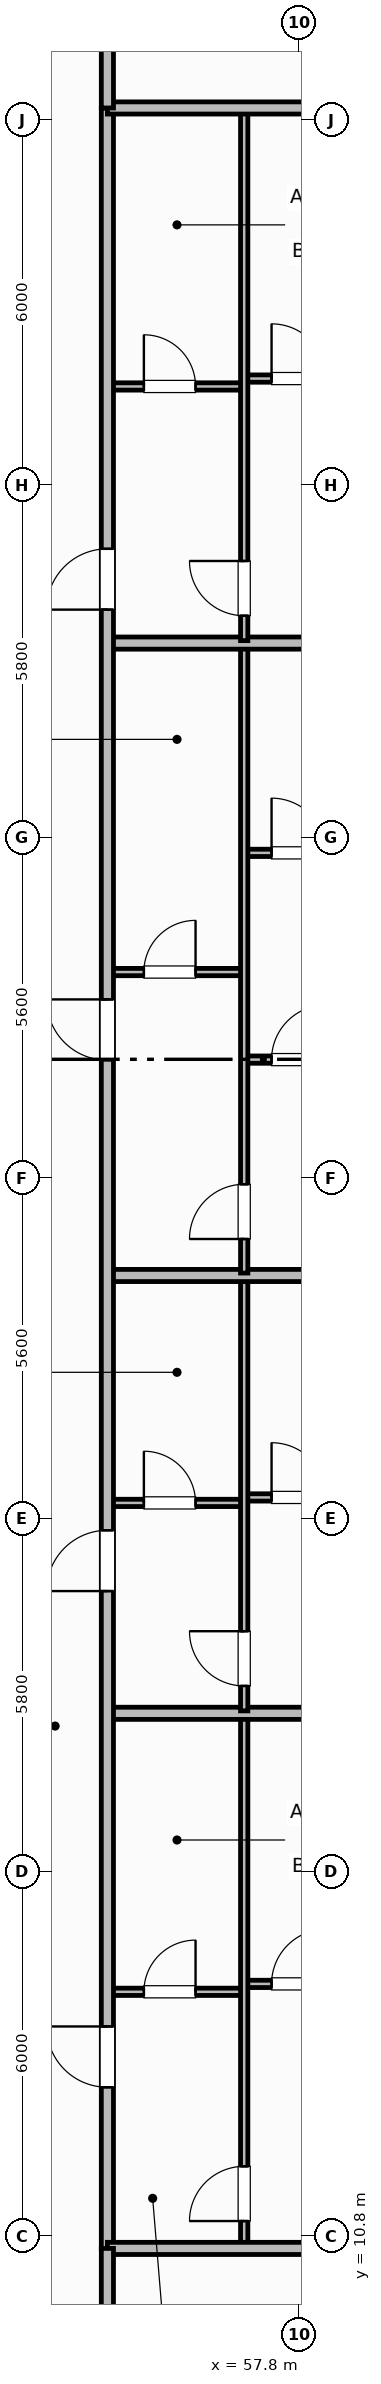
"""IFC4 building model, lengths in metres.
Left out: names, types, materials, properties, quantities, classifications, styles, units other than length and angle.
Written with IfcOpenShell. Run it as: python <this file> out.ifc"""

import sys

from ifc_helpers import new_model, si_unit, direction, frame, frame_2d, origin, place, context, subcontext, project, spatial, rectangle, extrude, element, fill, save


model = new_model("IFC4")
c1 = context("Model", 3, precision=1e-05, world=origin(), true_north=direction((0.0, 1.0)))
c2 = subcontext(c1, "Body", "Model", "MODEL_VIEW")
j1 = project(units=[si_unit("LENGTHUNIT", "METRE"), si_unit("PLANEANGLEUNIT", "RADIAN")], contexts=[c1])
p1 = place(None, origin())
s1 = spatial("IfcSite", under=j1, at=p1, CompositionType="ELEMENT")
p2 = place(p1, origin())
s2 = spatial("IfcBuilding", under=s1, at=p2, CompositionType="ELEMENT")
p3 = place(p2, frame((0.0, 0.0, 58.4)))
s3 = spatial("IfcBuildingStorey", under=s2, at=p3, CompositionType="ELEMENT", Elevation=58.4)
p4 = place(p3, frame((54.65, 14.82, 0.0), z_axis=(0.0, 0.0, 1.0), x_axis=(1.0, 0.0, 0.0)))
e1 = element("IfcWall", 1, at=p4, inside=s3, PredefinedType="PARTITIONING", context=c2, shape_type="SweptSolid", body=[
    extrude(rectangle(XDim=2.25, YDim=0.12, at=frame_2d((1.125, 0.0))), origin(), (0.0, 0.0, 1.0), 2.53),
])
p5 = place(p4, frame((0.6, 0.0, 0.0)))
e2 = element("IfcOpeningElement", 2, at=p5, cuts=e1, PredefinedType="OPENING", context=c2, shape_type="SweptSolid", body=[
    extrude(rectangle(XDim=0.85, YDim=2.1, at=frame_2d((0.425, 1.05))), frame((0.0, 0.07, 0.0), z_axis=(0.0, -1.0, 0.0), x_axis=(1.0, 0.0, 0.0)), (0.0, 0.0, 1.0), 0.14),
])
p6 = place(p3, frame((56.9, 14.95, 0.0), z_axis=(0.0, 0.0, 1.0), x_axis=(1.0, 0.0, 0.0)))
e3 = element("IfcWall", 3, at=p6, inside=s3, PredefinedType="PARTITIONING", context=c2, shape_type="SweptSolid", body=[
    extrude(rectangle(XDim=6.93, YDim=0.12, at=frame_2d((3.465, 0.0))), origin(), (0.0, 0.0, 1.0), 2.53),
])
p7 = place(p6, frame((0.45, 0.0, 0.0)))
e4 = element("IfcOpeningElement", 4, at=p7, cuts=e3, PredefinedType="OPENING", context=c2, shape_type="SweptSolid", body=[
    extrude(rectangle(XDim=0.9, YDim=2.1, at=frame_2d((0.45, 1.05))), frame((0.0, 0.07, 0.0), z_axis=(0.0, -1.0, 0.0), x_axis=(1.0, 0.0, 0.0)), (0.0, 0.0, 1.0), 0.14),
])
p8 = place(p3, frame((56.9, 10.64, 0.0), z_axis=(0.0, 0.0, 1.0), x_axis=(0.0, 1.0, 0.0)))
e5 = element("IfcWall", 5, at=p8, inside=s3, PredefinedType="PARTITIONING", context=c2, shape_type="SweptSolid", body=[
    extrude(rectangle(XDim=8.72, YDim=0.12, at=frame_2d((4.36, 0.0))), origin(), (0.0, 0.0, 1.0), 2.53),
])
p9 = place(p8, frame((0.41, 0.0, 0.0)))
e6 = element("IfcOpeningElement", 6, at=p9, cuts=e5, PredefinedType="OPENING", context=c2, shape_type="SweptSolid", body=[
    extrude(rectangle(XDim=0.9, YDim=2.1, at=frame_2d((0.45, 1.05))), frame((0.0, 0.07, 0.0), z_axis=(0.0, -1.0, 0.0), x_axis=(1.0, 0.0, 0.0)), (0.0, 0.0, 1.0), 0.14),
])
p10 = place(p3, frame((54.65, 19.4, 0.0), z_axis=(0.0, 0.0, 1.0), x_axis=(1.0, 0.0, 0.0)))
e7 = element("IfcWall", 7, at=p10, inside=s3, PredefinedType="PARTITIONING", context=c2, shape_type="SweptSolid", body=[
    extrude(rectangle(XDim=9.18, YDim=0.2, at=frame_2d((4.59, 0.0))), origin(), (0.0, 0.0, 1.0), 2.53),
])
p11 = place(p3, frame((54.65, 22.86, 0.0), z_axis=(0.0, 0.0, 1.0), x_axis=(1.0, 0.0, 0.0)))
e8 = element("IfcWall", 8, at=p11, inside=s3, PredefinedType="PARTITIONING", context=c2, shape_type="SweptSolid", body=[
    extrude(rectangle(XDim=2.25, YDim=0.12, at=frame_2d((1.125, 0.0))), origin(), (0.0, 0.0, 1.0), 2.53),
])
p12 = place(p11, frame((0.6, 0.0, 0.0)))
e9 = element("IfcOpeningElement", 9, at=p12, cuts=e8, PredefinedType="OPENING", context=c2, shape_type="SweptSolid", body=[
    extrude(rectangle(XDim=0.85, YDim=2.1, at=frame_2d((0.425, 1.05))), frame((0.0, 0.07, 0.0), z_axis=(0.0, -1.0, 0.0), x_axis=(1.0, 0.0, 0.0)), (0.0, 0.0, 1.0), 0.14),
])
p13 = place(p3, frame((56.9, 22.95, 0.0), z_axis=(0.0, 0.0, 1.0), x_axis=(1.0, 0.0, 0.0)))
e10 = element("IfcWall", 10, at=p13, inside=s3, PredefinedType="PARTITIONING", context=c2, shape_type="SweptSolid", body=[
    extrude(rectangle(XDim=6.93, YDim=0.12, at=frame_2d((3.465, 0.0))), origin(), (0.0, 0.0, 1.0), 2.53),
])
p14 = place(p13, frame((0.45, 0.0, 0.0)))
e11 = element("IfcOpeningElement", 11, at=p14, cuts=e10, PredefinedType="OPENING", context=c2, shape_type="SweptSolid", body=[
    extrude(rectangle(XDim=0.9, YDim=2.1, at=frame_2d((0.45, 1.05))), frame((0.0, 0.07, 0.0), z_axis=(0.0, -1.0, 0.0), x_axis=(1.0, 0.0, 0.0)), (0.0, 0.0, 1.0), 0.14),
])
p15 = place(p3, frame((56.9, 19.44, 0.0), z_axis=(0.0, 0.0, 1.0), x_axis=(0.0, 1.0, 0.0)))
e12 = element("IfcWall", 12, at=p15, inside=s3, PredefinedType="PARTITIONING", context=c2, shape_type="SweptSolid", body=[
    extrude(rectangle(XDim=7.12, YDim=0.12, at=frame_2d((3.56, 0.0))), origin(), (0.0, 0.0, 1.0), 2.53),
])
p16 = place(p15, frame((0.41, 0.0, 0.0)))
e13 = element("IfcOpeningElement", 13, at=p16, cuts=e12, PredefinedType="OPENING", context=c2, shape_type="SweptSolid", body=[
    extrude(rectangle(XDim=0.9, YDim=2.1, at=frame_2d((0.45, 1.05))), frame((0.0, 0.07, 0.0), z_axis=(0.0, -1.0, 0.0), x_axis=(1.0, 0.0, 0.0)), (0.0, 0.0, 1.0), 0.14),
])
p17 = place(p3, frame((54.65, 26.6, 0.0), z_axis=(0.0, 0.0, 1.0), x_axis=(1.0, 0.0, 0.0)))
e14 = element("IfcWall", 14, at=p17, inside=s3, PredefinedType="PARTITIONING", context=c2, shape_type="SweptSolid", body=[
    extrude(rectangle(XDim=8.78, YDim=0.2, at=frame_2d((4.39, 0.0))), origin(), (0.0, 0.0, 1.0), 2.53),
])
p18 = place(p3, frame((54.65, 31.59, 0.0), z_axis=(0.0, 0.0, 1.0), x_axis=(1.0, 0.0, 0.0)))
e15 = element("IfcWall", 15, at=p18, inside=s3, PredefinedType="PARTITIONING", context=c2, shape_type="SweptSolid", body=[
    extrude(rectangle(XDim=2.25, YDim=0.12, at=frame_2d((1.125, 0.0))), origin(), (0.0, 0.0, 1.0), 2.53),
])
p19 = place(p18, frame((0.6, 0.0, 0.0)))
e16 = element("IfcOpeningElement", 16, at=p19, cuts=e15, PredefinedType="OPENING", context=c2, shape_type="SweptSolid", body=[
    extrude(rectangle(XDim=0.85, YDim=2.1, at=frame_2d((0.425, 1.05))), frame((0.0, 0.07, 0.0), z_axis=(0.0, -1.0, 0.0), x_axis=(1.0, 0.0, 0.0)), (0.0, 0.0, 1.0), 0.14),
])
p20 = place(p3, frame((56.9, 30.15, 0.0), z_axis=(0.0, 0.0, 1.0), x_axis=(1.0, 0.0, 0.0)))
e17 = element("IfcWall", 17, at=p20, inside=s3, PredefinedType="PARTITIONING", context=c2, shape_type="SweptSolid", body=[
    extrude(rectangle(XDim=6.355, YDim=0.12, at=frame_2d((3.177, 0.0))), origin(), (0.0, 0.0, 1.0), 2.53),
])
p21 = place(p20, frame((0.45, 0.0, 0.0)))
e18 = element("IfcOpeningElement", 18, at=p21, cuts=e17, PredefinedType="OPENING", context=c2, shape_type="SweptSolid", body=[
    extrude(rectangle(XDim=0.9, YDim=2.1, at=frame_2d((0.45, 1.05))), frame((0.0, 0.07, 0.0), z_axis=(0.0, -1.0, 0.0), x_axis=(1.0, 0.0, 0.0)), (0.0, 0.0, 1.0), 0.14),
])
p22 = place(p3, frame((56.9, 33.55, 0.0), z_axis=(0.0, 0.0, 1.0), x_axis=(1.0, 0.0, 0.0)))
e19 = element("IfcWall", 19, at=p22, inside=s3, PredefinedType="PARTITIONING", context=c2, shape_type="SweptSolid", body=[
    extrude(rectangle(XDim=6.93, YDim=0.12, at=frame_2d((3.465, 0.0))), origin(), (0.0, 0.0, 1.0), 2.53),
])
p23 = place(p22, frame((0.45, 0.0, 0.0)))
e20 = element("IfcOpeningElement", 20, at=p23, cuts=e19, PredefinedType="OPENING", context=c2, shape_type="SweptSolid", body=[
    extrude(rectangle(XDim=0.9, YDim=2.1, at=frame_2d((0.45, 1.05))), frame((0.0, 0.07, 0.0), z_axis=(0.0, -1.0, 0.0), x_axis=(1.0, 0.0, 0.0)), (0.0, 0.0, 1.0), 0.14),
])
p24 = place(p3, frame((56.9, 26.64, 0.0), z_axis=(0.0, 0.0, 1.0), x_axis=(0.0, 1.0, 0.0)))
e21 = element("IfcWall", 21, at=p24, inside=s3, PredefinedType="PARTITIONING", context=c2, shape_type="SweptSolid", body=[
    extrude(rectangle(XDim=10.32, YDim=0.12, at=frame_2d((5.16, 0.0))), origin(), (0.0, 0.0, 1.0), 2.53),
])
p25 = place(p24, frame((0.56, 0.0, 0.0)))
e22 = element("IfcOpeningElement", 22, at=p25, cuts=e21, PredefinedType="OPENING", context=c2, shape_type="SweptSolid", body=[
    extrude(rectangle(XDim=0.9, YDim=2.1, at=frame_2d((0.45, 1.05))), frame((0.0, 0.07, 0.0), z_axis=(0.0, -1.0, 0.0), x_axis=(1.0, 0.0, 0.0)), (0.0, 0.0, 1.0), 0.14),
])
p26 = place(p3, frame((54.65, 37.0, 0.0), z_axis=(0.0, 0.0, 1.0), x_axis=(1.0, 0.0, 0.0)))
e23 = element("IfcWall", 23, at=p26, inside=s3, PredefinedType="PARTITIONING", context=c2, shape_type="SweptSolid", body=[
    extrude(rectangle(XDim=9.18, YDim=0.2, at=frame_2d((4.59, 0.0))), origin(), (0.0, 0.0, 1.0), 2.53),
])
p27 = place(p3, frame((54.65, 41.22, 0.0), z_axis=(0.0, 0.0, 1.0), x_axis=(1.0, 0.0, 0.0)))
e24 = element("IfcWall", 24, at=p27, inside=s3, PredefinedType="PARTITIONING", context=c2, shape_type="SweptSolid", body=[
    extrude(rectangle(XDim=2.25, YDim=0.12, at=frame_2d((1.125, 0.0))), origin(), (0.0, 0.0, 1.0), 2.53),
])
p28 = place(p27, frame((0.6, 0.0, 0.0)))
e25 = element("IfcOpeningElement", 25, at=p28, cuts=e24, PredefinedType="OPENING", context=c2, shape_type="SweptSolid", body=[
    extrude(rectangle(XDim=0.85, YDim=2.1, at=frame_2d((0.425, 1.05))), frame((0.0, 0.07, 0.0), z_axis=(0.0, -1.0, 0.0), x_axis=(1.0, 0.0, 0.0)), (0.0, 0.0, 1.0), 0.14),
])
p29 = place(p3, frame((56.9, 41.35, 0.0), z_axis=(0.0, 0.0, 1.0), x_axis=(1.0, 0.0, 0.0)))
e26 = element("IfcWall", 26, at=p29, inside=s3, PredefinedType="PARTITIONING", context=c2, shape_type="SweptSolid", body=[
    extrude(rectangle(XDim=6.93, YDim=0.12, at=frame_2d((3.465, 0.0))), origin(), (0.0, 0.0, 1.0), 2.53),
])
p30 = place(p29, frame((0.45, 0.0, 0.0)))
e27 = element("IfcOpeningElement", 27, at=p30, cuts=e26, PredefinedType="OPENING", context=c2, shape_type="SweptSolid", body=[
    extrude(rectangle(XDim=0.9, YDim=2.1, at=frame_2d((0.45, 1.05))), frame((0.0, 0.07, 0.0), z_axis=(0.0, -1.0, 0.0), x_axis=(1.0, 0.0, 0.0)), (0.0, 0.0, 1.0), 0.14),
])
p31 = place(p3, frame((56.9, 37.04, 0.0), z_axis=(0.0, 0.0, 1.0), x_axis=(0.0, 1.0, 0.0)))
e28 = element("IfcWall", 28, at=p31, inside=s3, PredefinedType="PARTITIONING", context=c2, shape_type="SweptSolid", body=[
    extrude(rectangle(XDim=8.72, YDim=0.12, at=frame_2d((4.36, 0.0))), origin(), (0.0, 0.0, 1.0), 2.53),
])
p32 = place(p31, frame((0.41, 0.0, 0.0)))
e29 = element("IfcOpeningElement", 29, at=p32, cuts=e28, PredefinedType="OPENING", context=c2, shape_type="SweptSolid", body=[
    extrude(rectangle(XDim=0.9, YDim=2.1, at=frame_2d((0.45, 1.05))), frame((0.0, 0.07, 0.0), z_axis=(0.0, -1.0, 0.0), x_axis=(1.0, 0.0, 0.0)), (0.0, 0.0, 1.0), 0.14),
])
p33 = place(p3, frame((54.65, 10.6, 0.0), z_axis=(0.0, 0.0, 1.0), x_axis=(0.0, 1.0, 0.0)))
e30 = element("IfcWall", 30, at=p33, inside=s3, PredefinedType="PARTITIONING", context=c2, shape_type="SweptSolid", body=[
    extrude(rectangle(XDim=35.2, YDim=0.2, at=frame_2d((17.6, 0.0))), origin(), (0.0, 0.0, 1.0), 2.53),
])
p34 = place(p33, frame((2.65, 0.0, 0.0)))
e31 = element("IfcOpeningElement", 31, at=p34, cuts=e30, PredefinedType="OPENING", context=c2, shape_type="SweptSolid", body=[
    extrude(rectangle(XDim=1.0, YDim=2.15, at=frame_2d((0.5, 1.075))), frame((0.0, 0.11, 0.0), z_axis=(0.0, -1.0, 0.0), x_axis=(1.0, 0.0, 0.0)), (0.0, 0.0, 1.0), 0.22),
])
p35 = place(p33, frame((10.81, 0.0, 0.0)))
e32 = element("IfcOpeningElement", 32, at=p35, cuts=e30, PredefinedType="OPENING", context=c2, shape_type="SweptSolid", body=[
    extrude(rectangle(XDim=1.0, YDim=2.15, at=frame_2d((0.5, 1.075))), frame((0.0, 0.11, 0.0), z_axis=(0.0, -1.0, 0.0), x_axis=(1.0, 0.0, 0.0)), (0.0, 0.0, 1.0), 0.22),
])
p36 = place(p33, frame((19.54, 0.0, 0.0)))
e33 = element("IfcOpeningElement", 33, at=p36, cuts=e30, PredefinedType="OPENING", context=c2, shape_type="SweptSolid", body=[
    extrude(rectangle(XDim=1.0, YDim=2.15, at=frame_2d((0.5, 1.075))), frame((0.0, 0.11, 0.0), z_axis=(0.0, -1.0, 0.0), x_axis=(1.0, 0.0, 0.0)), (0.0, 0.0, 1.0), 0.22),
])
p37 = place(p33, frame((26.95, 0.0, 0.0)))
e34 = element("IfcOpeningElement", 34, at=p37, cuts=e30, PredefinedType="OPENING", context=c2, shape_type="SweptSolid", body=[
    extrude(rectangle(XDim=1.0, YDim=2.15, at=frame_2d((0.5, 1.075))), frame((0.0, 0.11, 0.0), z_axis=(0.0, -1.0, 0.0), x_axis=(1.0, 0.0, 0.0)), (0.0, 0.0, 1.0), 0.22),
])
for number, where, z_axis, x_axis in (
    (35, (54.65, 10.6, 0.0), (0.0, 0.0, 1.0), (1.0, 0.0, 0.0)),
    (36, (54.65, 45.8, 0.0), (0.0, 0.0, 1.0), (1.0, 0.0, 0.0)),
):
    element("IfcWall", number, at=place(p3, frame(where, z_axis=z_axis, x_axis=x_axis)), inside=s3, PredefinedType="PARTITIONING", context=c2, shape_type="SweptSolid", body=[
        extrude(rectangle(XDim=8.76, YDim=0.2, at=frame_2d((4.38, 0.0))), origin(), (0.0, 0.0, 1.0), 2.53),
    ])
p38 = place(p3, frame((54.65, 4.97, 0.0), z_axis=(0.0, 0.0, 1.0), x_axis=(0.0, 1.0, 0.0)))
e37 = element("IfcWall", 37, at=p38, inside=s3, PredefinedType="PARTITIONING", context=c2, shape_type="SweptSolid", body=[
    extrude(rectangle(XDim=5.63, YDim=0.2, at=frame_2d((2.815, 0.0))), origin(), (0.0, 0.0, 1.0), 2.53),
])
p39 = place(p3, frame((54.65, 45.8, 0.0), z_axis=(0.0, 0.0, 1.0), x_axis=(0.0, 1.0, 0.0)))
e38 = element("IfcWall", 38, at=p39, inside=s3, PredefinedType="PARTITIONING", context=c2, shape_type="SweptSolid", body=[
    extrude(rectangle(XDim=5.63, YDim=0.2, at=frame_2d((2.815, 0.0))), origin(), (0.0, 0.0, 1.0), 2.53),
])
p40 = place(p5, origin())
e39 = element("IfcDoor", 39, at=p40, inside=s3, OperationType="SINGLE_SWING_RIGHT", PredefinedType="DOOR", context=c2, shape_type="SweptSolid", body=[
    extrude(rectangle(XDim=0.85, YDim=2.1, at=frame_2d((0.425, 1.05))), frame((0.0, 0.025, 0.0), z_axis=(0.0, -1.0, 0.0), x_axis=(1.0, 0.0, 0.0)), (0.0, 0.0, 1.0), 0.05),
])
fill(e2, e39)
p41 = place(p7, origin())
e40 = element("IfcDoor", 40, at=p41, inside=s3, OperationType="SINGLE_SWING_RIGHT", PredefinedType="DOOR", context=c2, shape_type="SweptSolid", body=[
    extrude(rectangle(XDim=0.9, YDim=2.1, at=frame_2d((0.45, 1.05))), frame((0.0, 0.025, 0.0), z_axis=(0.0, -1.0, 0.0), x_axis=(1.0, 0.0, 0.0)), (0.0, 0.0, 1.0), 0.05),
])
fill(e4, e40)
p42 = place(p9, origin())
e41 = element("IfcDoor", 41, at=p42, inside=s3, OperationType="SINGLE_SWING_LEFT", PredefinedType="DOOR", context=c2, shape_type="SweptSolid", body=[
    extrude(rectangle(XDim=0.9, YDim=2.1, at=frame_2d((0.45, 1.05))), frame((0.0, 0.025, 0.0), z_axis=(0.0, -1.0, 0.0), x_axis=(1.0, 0.0, 0.0)), (0.0, 0.0, 1.0), 0.05),
])
fill(e6, e41)
p43 = place(p12, origin())
e42 = element("IfcDoor", 42, at=p43, inside=s3, OperationType="SINGLE_SWING_LEFT", PredefinedType="DOOR", context=c2, shape_type="SweptSolid", body=[
    extrude(rectangle(XDim=0.85, YDim=2.1, at=frame_2d((0.425, 1.05))), frame((0.0, 0.025, 0.0), z_axis=(0.0, -1.0, 0.0), x_axis=(1.0, 0.0, 0.0)), (0.0, 0.0, 1.0), 0.05),
])
fill(e9, e42)
p44 = place(p14, origin())
e43 = element("IfcDoor", 43, at=p44, inside=s3, OperationType="SINGLE_SWING_LEFT", PredefinedType="DOOR", context=c2, shape_type="SweptSolid", body=[
    extrude(rectangle(XDim=0.9, YDim=2.1, at=frame_2d((0.45, 1.05))), frame((0.0, 0.025, 0.0), z_axis=(0.0, -1.0, 0.0), x_axis=(1.0, 0.0, 0.0)), (0.0, 0.0, 1.0), 0.05),
])
fill(e11, e43)
p45 = place(p16, origin())
e44 = element("IfcDoor", 44, at=p45, inside=s3, OperationType="SINGLE_SWING_RIGHT", PredefinedType="DOOR", context=c2, shape_type="SweptSolid", body=[
    extrude(rectangle(XDim=0.9, YDim=2.1, at=frame_2d((0.45, 1.05))), frame((0.0, 0.025, 0.0), z_axis=(0.0, -1.0, 0.0), x_axis=(1.0, 0.0, 0.0)), (0.0, 0.0, 1.0), 0.05),
])
fill(e13, e44)
p46 = place(p19, origin())
e45 = element("IfcDoor", 45, at=p46, inside=s3, OperationType="SINGLE_SWING_RIGHT", PredefinedType="DOOR", context=c2, shape_type="SweptSolid", body=[
    extrude(rectangle(XDim=0.85, YDim=2.1, at=frame_2d((0.425, 1.05))), frame((0.0, 0.025, 0.0), z_axis=(0.0, -1.0, 0.0), x_axis=(1.0, 0.0, 0.0)), (0.0, 0.0, 1.0), 0.05),
])
fill(e16, e45)
p47 = place(p21, origin())
e46 = element("IfcDoor", 46, at=p47, inside=s3, OperationType="SINGLE_SWING_RIGHT", PredefinedType="DOOR", context=c2, shape_type="SweptSolid", body=[
    extrude(rectangle(XDim=0.9, YDim=2.1, at=frame_2d((0.45, 1.05))), frame((0.0, 0.025, 0.0), z_axis=(0.0, -1.0, 0.0), x_axis=(1.0, 0.0, 0.0)), (0.0, 0.0, 1.0), 0.05),
])
fill(e18, e46)
p48 = place(p23, origin())
e47 = element("IfcDoor", 47, at=p48, inside=s3, OperationType="SINGLE_SWING_LEFT", PredefinedType="DOOR", context=c2, shape_type="SweptSolid", body=[
    extrude(rectangle(XDim=0.9, YDim=2.1, at=frame_2d((0.45, 1.05))), frame((0.0, 0.025, 0.0), z_axis=(0.0, -1.0, 0.0), x_axis=(1.0, 0.0, 0.0)), (0.0, 0.0, 1.0), 0.05),
])
fill(e20, e47)
p49 = place(p25, origin())
e48 = element("IfcDoor", 48, at=p49, inside=s3, OperationType="SINGLE_SWING_LEFT", PredefinedType="DOOR", context=c2, shape_type="SweptSolid", body=[
    extrude(rectangle(XDim=0.9, YDim=2.1, at=frame_2d((0.45, 1.05))), frame((0.0, 0.025, 0.0), z_axis=(0.0, -1.0, 0.0), x_axis=(1.0, 0.0, 0.0)), (0.0, 0.0, 1.0), 0.05),
])
fill(e22, e48)
p50 = place(p28, origin())
e49 = element("IfcDoor", 49, at=p50, inside=s3, OperationType="SINGLE_SWING_LEFT", PredefinedType="DOOR", context=c2, shape_type="SweptSolid", body=[
    extrude(rectangle(XDim=0.85, YDim=2.1, at=frame_2d((0.425, 1.05))), frame((0.0, 0.025, 0.0), z_axis=(0.0, -1.0, 0.0), x_axis=(1.0, 0.0, 0.0)), (0.0, 0.0, 1.0), 0.05),
])
fill(e25, e49)
p51 = place(p30, origin())
e50 = element("IfcDoor", 50, at=p51, inside=s3, OperationType="SINGLE_SWING_LEFT", PredefinedType="DOOR", context=c2, shape_type="SweptSolid", body=[
    extrude(rectangle(XDim=0.9, YDim=2.1, at=frame_2d((0.45, 1.05))), frame((0.0, 0.025, 0.0), z_axis=(0.0, -1.0, 0.0), x_axis=(1.0, 0.0, 0.0)), (0.0, 0.0, 1.0), 0.05),
])
fill(e27, e50)
p52 = place(p32, origin())
e51 = element("IfcDoor", 51, at=p52, inside=s3, OperationType="SINGLE_SWING_RIGHT", PredefinedType="DOOR", context=c2, shape_type="SweptSolid", body=[
    extrude(rectangle(XDim=0.9, YDim=2.1, at=frame_2d((0.45, 1.05))), frame((0.0, 0.025, 0.0), z_axis=(0.0, -1.0, 0.0), x_axis=(1.0, 0.0, 0.0)), (0.0, 0.0, 1.0), 0.05),
])
fill(e29, e51)
p53 = place(p34, origin())
e52 = element("IfcDoor", 52, at=p53, inside=s3, OperationType="SINGLE_SWING_RIGHT", PredefinedType="DOOR", context=c2, shape_type="SweptSolid", body=[
    extrude(rectangle(XDim=1.0, YDim=2.15, at=frame_2d((0.5, 1.075))), frame((0.0, 0.025, 0.0), z_axis=(0.0, -1.0, 0.0), x_axis=(1.0, 0.0, 0.0)), (0.0, 0.0, 1.0), 0.05),
])
fill(e31, e52)
p54 = place(p35, origin())
e53 = element("IfcDoor", 53, at=p54, inside=s3, OperationType="SINGLE_SWING_LEFT", PredefinedType="DOOR", context=c2, shape_type="SweptSolid", body=[
    extrude(rectangle(XDim=1.0, YDim=2.15, at=frame_2d((0.5, 1.075))), frame((0.0, 0.025, 0.0), z_axis=(0.0, -1.0, 0.0), x_axis=(1.0, 0.0, 0.0)), (0.0, 0.0, 1.0), 0.05),
])
fill(e32, e53)
p55 = place(p36, origin())
e54 = element("IfcDoor", 54, at=p55, inside=s3, OperationType="SINGLE_SWING_RIGHT", PredefinedType="DOOR", context=c2, shape_type="SweptSolid", body=[
    extrude(rectangle(XDim=1.0, YDim=2.15, at=frame_2d((0.5, 1.075))), frame((0.0, 0.025, 0.0), z_axis=(0.0, -1.0, 0.0), x_axis=(1.0, 0.0, 0.0)), (0.0, 0.0, 1.0), 0.05),
])
fill(e33, e54)
p56 = place(p37, origin())
e55 = element("IfcDoor", 55, at=p56, inside=s3, OperationType="SINGLE_SWING_LEFT", PredefinedType="DOOR", context=c2, shape_type="SweptSolid", body=[
    extrude(rectangle(XDim=1.0, YDim=2.15, at=frame_2d((0.5, 1.075))), frame((0.0, 0.025, 0.0), z_axis=(0.0, -1.0, 0.0), x_axis=(1.0, 0.0, 0.0)), (0.0, 0.0, 1.0), 0.05),
])
fill(e34, e55)
save(model, sys.argv[1])
